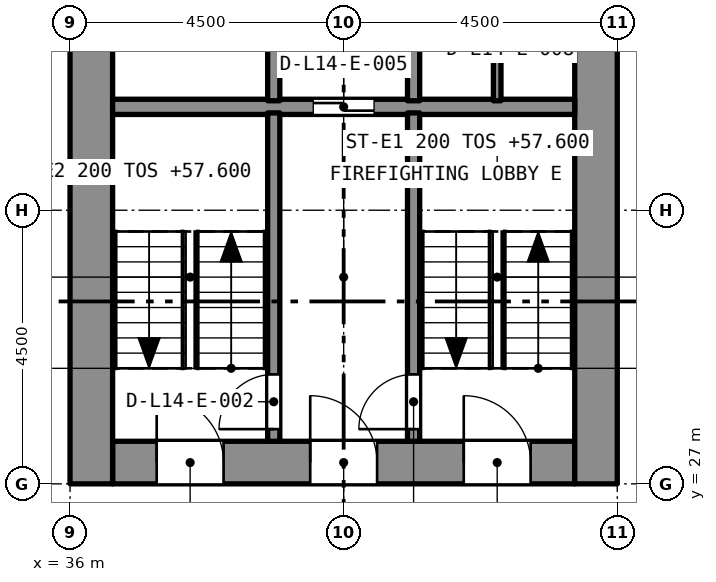
"""IFC4 building model, lengths in metres.
Left out: names, types, materials, properties, quantities, classifications, styles, units other than length and angle.
Written with IfcOpenShell. Run it as: python <this file> out.ifc"""

import sys

from ifc_helpers import new_model, si_unit, direction, frame, frame_2d, origin, place, context, subcontext, project, spatial, rectangle, extrude, element, fill, save


model = new_model("IFC4")
c1 = context("Model", 3, precision=1e-05, world=origin(), true_north=direction((0.0, 1.0)))
c2 = subcontext(c1, "Body", "Model", "MODEL_VIEW")
j1 = project(units=[si_unit("LENGTHUNIT", "METRE"), si_unit("PLANEANGLEUNIT", "RADIAN")], contexts=[c1])
p1 = place(None, origin())
s1 = spatial("IfcSite", under=j1, at=p1, CompositionType="ELEMENT")
p2 = place(p1, origin())
s2 = spatial("IfcBuilding", under=s1, at=p2, CompositionType="ELEMENT")
p3 = place(p2, frame((0.0, 0.0, 56.0)))
s3 = spatial("IfcBuildingStorey", under=s2, at=p3, CompositionType="ELEMENT", Elevation=56.0)
p4 = place(p3, frame((36.7, 27.35, 0.0), z_axis=(0.0, 0.0, 1.0), x_axis=(1.0, 0.0, 0.0)))
e1 = element("IfcWall", 1, at=p4, inside=s3, PredefinedType="SOLIDWALL", context=c2, shape_type="SweptSolid", body=[
    extrude(rectangle(XDim=7.6, YDim=0.7, at=frame_2d((3.8, 0.0))), origin(), (0.0, 0.0, 1.0), 3.2),
])
p5 = place(p4, frame((5.775, 0.0, 0.0)))
e2 = element("IfcOpeningElement", 2, at=p5, cuts=e1, PredefinedType="OPENING", context=c2, shape_type="SweptSolid", body=[
    extrude(rectangle(XDim=1.1, YDim=2.1, at=frame_2d((0.55, 1.05))), frame((0.0, 0.36, 0.0), z_axis=(0.0, -1.0, 0.0), x_axis=(1.0, 0.0, 0.0)), (0.0, 0.0, 1.0), 0.72),
])
p6 = place(p4, frame((3.25, 0.0, 0.0)))
e3 = element("IfcOpeningElement", 3, at=p6, cuts=e1, PredefinedType="OPENING", context=c2, shape_type="SweptSolid", body=[
    extrude(rectangle(XDim=1.1, YDim=2.1, at=frame_2d((0.55, 1.05))), frame((0.0, 0.36, 0.0), z_axis=(0.0, -1.0, 0.0), x_axis=(1.0, 0.0, 0.0)), (0.0, 0.0, 1.0), 0.72),
])
p7 = place(p4, frame((0.725, 0.0, 0.0)))
e4 = element("IfcOpeningElement", 4, at=p7, cuts=e1, PredefinedType="OPENING", context=c2, shape_type="SweptSolid", body=[
    extrude(rectangle(XDim=1.1, YDim=2.1, at=frame_2d((0.55, 1.05))), frame((0.0, 0.36, 0.0), z_axis=(0.0, -1.0, 0.0), x_axis=(1.0, 0.0, 0.0)), (0.0, 0.0, 1.0), 0.72),
])
p8 = place(p3, frame((36.35, 27.0, 0.0), z_axis=(0.0, 0.0, 1.0), x_axis=(0.0, 1.0, 0.0)))
e5 = element("IfcWall", 5, at=p8, inside=s3, PredefinedType="SOLIDWALL", context=c2, shape_type="SweptSolid", body=[
    extrude(rectangle(XDim=13.5, YDim=0.7, at=frame_2d((6.75, 0.0))), origin(), (0.0, 0.0, 1.0), 3.2),
])
p9 = place(p8, frame((8.95, 0.0, 0.0)))
e6 = element("IfcOpeningElement", 6, at=p9, cuts=e5, PredefinedType="OPENING", context=c2, shape_type="SweptSolid", body=[
    extrude(rectangle(XDim=1.2, YDim=2.1, at=frame_2d((0.6, 1.05))), frame((0.0, 0.36, 0.0), z_axis=(0.0, -1.0, 0.0), x_axis=(1.0, 0.0, 0.0)), (0.0, 0.0, 1.0), 0.72),
])
p10 = place(p3, frame((44.65, 27.0, 0.0), z_axis=(0.0, 0.0, 1.0), x_axis=(0.0, 1.0, 0.0)))
e7 = element("IfcWall", 7, at=p10, inside=s3, PredefinedType="SOLIDWALL", context=c2, shape_type="SweptSolid", body=[
    extrude(rectangle(XDim=13.5, YDim=0.7, at=frame_2d((6.75, 0.0))), origin(), (0.0, 0.0, 1.0), 3.2),
])
p11 = place(p10, frame((8.95, 0.0, 0.0)))
e8 = element("IfcOpeningElement", 8, at=p11, cuts=e7, PredefinedType="OPENING", context=c2, shape_type="SweptSolid", body=[
    extrude(rectangle(XDim=1.2, YDim=2.1, at=frame_2d((0.6, 1.05))), frame((0.0, 0.36, 0.0), z_axis=(0.0, -1.0, 0.0), x_axis=(1.0, 0.0, 0.0)), (0.0, 0.0, 1.0), 0.72),
])
p12 = place(p3, frame((36.7, 33.2, 0.0), z_axis=(0.0, 0.0, 1.0), x_axis=(1.0, 0.0, 0.0)))
e9 = element("IfcWall", 9, at=p12, inside=s3, PredefinedType="SOLIDWALL", context=c2, shape_type="SweptSolid", body=[
    extrude(rectangle(XDim=7.6, YDim=0.25, at=frame_2d((3.8, 0.0))), origin(), (0.0, 0.0, 1.0), 2.9),
])
p13 = place(p12, frame((3.3, 0.0, 0.0)))
e10 = element("IfcOpeningElement", 10, at=p13, cuts=e9, PredefinedType="OPENING", context=c2, shape_type="SweptSolid", body=[
    extrude(rectangle(XDim=1.0, YDim=2.1, at=frame_2d((0.5, 1.05))), frame((0.0, 0.135, 0.0), z_axis=(0.0, -1.0, 0.0), x_axis=(1.0, 0.0, 0.0)), (0.0, 0.0, 1.0), 0.27),
])
p14 = place(p3, frame((41.65, 27.7, 0.0), z_axis=(0.0, 0.0, 1.0), x_axis=(0.0, 1.0, 0.0)))
e11 = element("IfcWall", 11, at=p14, inside=s3, PredefinedType="SOLIDWALL", context=c2, shape_type="SweptSolid", body=[
    extrude(rectangle(XDim=5.4, YDim=0.2, at=frame_2d((2.7, 0.0))), origin(), (0.0, 0.0, 1.0), 2.9),
])
p15 = place(p14, frame((0.2, 0.0, 0.0)))
e12 = element("IfcOpeningElement", 12, at=p15, cuts=e11, PredefinedType="OPENING", context=c2, shape_type="SweptSolid", body=[
    extrude(rectangle(XDim=0.9, YDim=2.1, at=frame_2d((0.45, 1.05))), frame((0.0, 0.11, 0.0), z_axis=(0.0, -1.0, 0.0), x_axis=(1.0, 0.0, 0.0)), (0.0, 0.0, 1.0), 0.22),
])
p16 = place(p3, frame((39.35, 27.7, 0.0), z_axis=(0.0, 0.0, 1.0), x_axis=(0.0, 1.0, 0.0)))
e13 = element("IfcWall", 13, at=p16, inside=s3, PredefinedType="SOLIDWALL", context=c2, shape_type="SweptSolid", body=[
    extrude(rectangle(XDim=5.4, YDim=0.2, at=frame_2d((2.7, 0.0))), origin(), (0.0, 0.0, 1.0), 2.9),
])
p17 = place(p16, frame((0.2, 0.0, 0.0)))
e14 = element("IfcOpeningElement", 14, at=p17, cuts=e13, PredefinedType="OPENING", context=c2, shape_type="SweptSolid", body=[
    extrude(rectangle(XDim=0.9, YDim=2.1, at=frame_2d((0.45, 1.05))), frame((0.0, 0.11, 0.0), z_axis=(0.0, -1.0, 0.0), x_axis=(1.0, 0.0, 0.0)), (0.0, 0.0, 1.0), 0.22),
])
for number, where, z_axis, x_axis in (
    (15, (41.65, 33.3, 0.0), (0.0, 0.0, 1.0), (0.0, 1.0, 0.0)),
    (16, (39.35, 33.3, 0.0), (0.0, 0.0, 1.0), (0.0, 1.0, 0.0)),
):
    element("IfcWall", number, at=place(p3, frame(where, z_axis=z_axis, x_axis=x_axis)), inside=s3, PredefinedType="SOLIDWALL", context=c2, shape_type="SweptSolid", body=[
        extrude(rectangle(XDim=2.3, YDim=0.2, at=frame_2d((1.15, 0.0))), origin(), (0.0, 0.0, 1.0), 2.9),
    ])
p18 = place(p3, frame((43.025, 33.3, 0.0), z_axis=(0.0, 0.0, 1.0), x_axis=(0.0, 1.0, 0.0)))
e17 = element("IfcWall", 17, at=p18, inside=s3, PredefinedType="PARTITIONING", context=c2, shape_type="SweptSolid", body=[
    extrude(rectangle(XDim=2.3, YDim=0.125, at=frame_2d((1.15, 0.0))), origin(), (0.0, 0.0, 1.0), 2.9),
])
p19 = place(p15, origin())
e18 = element("IfcDoor", 18, at=p19, inside=s3, OperationType="SINGLE_SWING_LEFT", PredefinedType="DOOR", context=c2, shape_type="SweptSolid", body=[
    extrude(rectangle(XDim=0.9, YDim=2.1, at=frame_2d((0.45, 1.05))), frame((0.0, 0.025, 0.0), z_axis=(0.0, -1.0, 0.0), x_axis=(1.0, 0.0, 0.0)), (0.0, 0.0, 1.0), 0.05),
])
fill(e12, e18)
p20 = place(p17, origin())
e19 = element("IfcDoor", 19, at=p20, inside=s3, OperationType="SINGLE_SWING_LEFT", PredefinedType="DOOR", context=c2, shape_type="SweptSolid", body=[
    extrude(rectangle(XDim=0.9, YDim=2.1, at=frame_2d((0.45, 1.05))), frame((0.0, 0.025, 0.0), z_axis=(0.0, -1.0, 0.0), x_axis=(1.0, 0.0, 0.0)), (0.0, 0.0, 1.0), 0.05),
])
fill(e14, e19)
p21 = place(p13, origin())
e20 = element("IfcDoor", 20, at=p21, inside=s3, OperationType="SLIDING_TO_LEFT", PredefinedType="DOOR", context=c2, shape_type="SweptSolid", body=[
    extrude(rectangle(XDim=1.0, YDim=2.1, at=frame_2d((0.5, 1.05))), frame((0.0, 0.025, 0.0), z_axis=(0.0, -1.0, 0.0), x_axis=(1.0, 0.0, 0.0)), (0.0, 0.0, 1.0), 0.05),
])
fill(e10, e20)
p22 = place(p5, origin())
e21 = element("IfcDoor", 21, at=p22, inside=s3, OperationType="SINGLE_SWING_LEFT", PredefinedType="DOOR", context=c2, shape_type="SweptSolid", body=[
    extrude(rectangle(XDim=1.1, YDim=2.1, at=frame_2d((0.55, 1.05))), frame((0.0, 0.025, 0.0), z_axis=(0.0, -1.0, 0.0), x_axis=(1.0, 0.0, 0.0)), (0.0, 0.0, 1.0), 0.05),
])
fill(e2, e21)
p23 = place(p6, origin())
e22 = element("IfcDoor", 22, at=p23, inside=s3, OperationType="SINGLE_SWING_LEFT", PredefinedType="DOOR", context=c2, shape_type="SweptSolid", body=[
    extrude(rectangle(XDim=1.1, YDim=2.1, at=frame_2d((0.55, 1.05))), frame((0.0, 0.025, 0.0), z_axis=(0.0, -1.0, 0.0), x_axis=(1.0, 0.0, 0.0)), (0.0, 0.0, 1.0), 0.05),
])
fill(e3, e22)
p24 = place(p7, origin())
e23 = element("IfcDoor", 23, at=p24, inside=s3, OperationType="SINGLE_SWING_LEFT", PredefinedType="DOOR", context=c2, shape_type="SweptSolid", body=[
    extrude(rectangle(XDim=1.1, YDim=2.1, at=frame_2d((0.55, 1.05))), frame((0.0, 0.025, 0.0), z_axis=(0.0, -1.0, 0.0), x_axis=(1.0, 0.0, 0.0)), (0.0, 0.0, 1.0), 0.05),
])
fill(e4, e23)
save(model, sys.argv[1])
